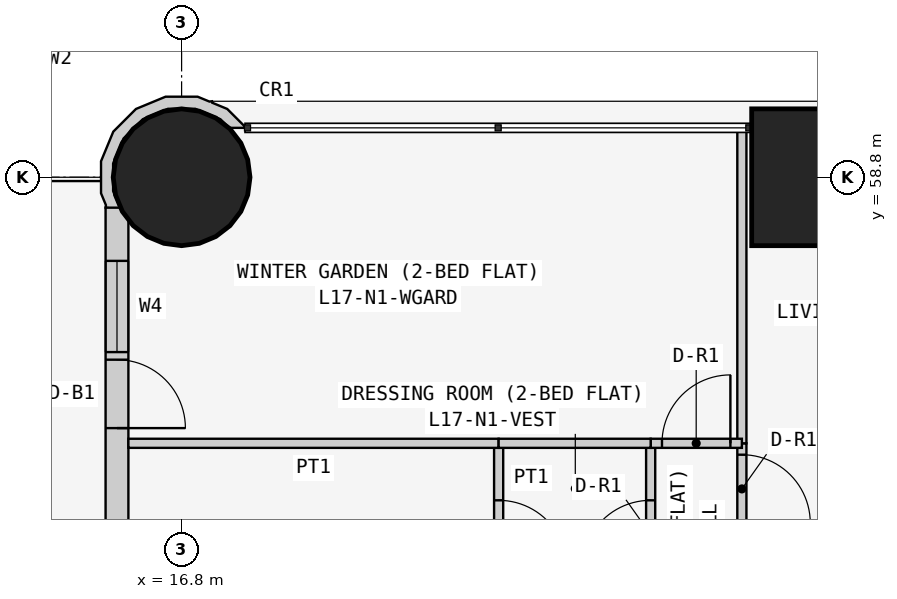
"""IFC4 building model, lengths in metres.
Left out: names, types, materials, properties, quantities, classifications, styles, units other than length and angle.
Written with IfcOpenShell. Run it as: python <this file> out.ifc"""

import sys

from ifc_helpers import new_model, si_unit, direction, frame, frame_2d, origin, origin_2d, place, context, subcontext, project, spatial, polyline, rectangle, circle, outline, extrude, element, fill, save


model = new_model("IFC4")
c1 = context("Model", 3, precision=1e-05, world=origin(), true_north=direction((0.0, 1.0)))
c2 = subcontext(c1, "Body", "Model", "MODEL_VIEW")
j1 = project(units=[si_unit("LENGTHUNIT", "METRE"), si_unit("PLANEANGLEUNIT", "RADIAN")], contexts=[c1])
p1 = place(None, origin())
s1 = spatial("IfcSite", under=j1, at=p1, CompositionType="ELEMENT")
p2 = place(p1, origin())
s2 = spatial("IfcBuilding", under=s1, at=p2, CompositionType="ELEMENT")
p3 = place(p2, frame((0.0, 0.0, 70.5)))
s3 = spatial("IfcBuildingStorey", under=s2, at=p3, CompositionType="ELEMENT", Elevation=70.5)
p4 = place(p3, frame((16.8, 58.8, 0.0), z_axis=(0.0, 0.0, 1.0), x_axis=(1.0, 0.0, 0.0)))
e1 = element("IfcColumn", 1, at=p4, inside=s3, PredefinedType="COLUMN", context=c2, shape_type="SweptSolid", body=[
    extrude(circle(Radius=0.9, at=origin_2d()), origin(), (0.0, 0.0, 1.0), 3.6),
])
p5 = place(p3, frame((25.2, 58.8, 0.0), z_axis=(0.0, 0.0, 1.0), x_axis=(1.0, 0.0, 0.0)))
e2 = element("IfcColumn", 2, at=p5, inside=s3, PredefinedType="COLUMN", context=c2, shape_type="SweptSolid", body=[
    extrude(rectangle(XDim=1.8, YDim=1.8, at=origin_2d()), origin(), (0.0, 0.0, 1.0), 3.6),
])
p6 = place(p3, frame((15.95, 58.4, 0.0), z_axis=(0.0, 0.0, 1.0), x_axis=(0.0, -1.0, 0.0)))
e3 = element("IfcWall", 3, at=p6, inside=s3, PredefinedType="SOLIDWALL", context=c2, shape_type="SweptSolid", body=[
    extrude(rectangle(XDim=15.7, YDim=0.3, at=frame_2d((7.85, 0.0))), origin(), (0.0, 0.0, 1.0), 3.45),
])
p7 = place(p6, frame((12.4, 0.0, 0.9)))
e4 = element("IfcOpeningElement", 4, at=p7, cuts=e3, PredefinedType="OPENING", context=c2, shape_type="SweptSolid", body=[
    extrude(rectangle(XDim=1.8, YDim=1.5, at=frame_2d((0.9, 0.75))), frame((0.0, 0.16, 0.0), z_axis=(0.0, -1.0, 0.0), x_axis=(1.0, 0.0, 0.0)), (0.0, 0.0, 1.0), 0.32),
])
p8 = place(p6, frame((9.55, 0.0, 1.5)))
e5 = element("IfcOpeningElement", 5, at=p8, cuts=e3, PredefinedType="OPENING", context=c2, shape_type="SweptSolid", body=[
    extrude(rectangle(XDim=0.9, YDim=0.7, at=frame_2d((0.45, 0.35))), frame((0.0, 0.16, 0.0), z_axis=(0.0, -1.0, 0.0), x_axis=(1.0, 0.0, 0.0)), (0.0, 0.0, 1.0), 0.32),
])
p9 = place(p6, frame((5.1, 0.0, 0.9)))
e6 = element("IfcOpeningElement", 6, at=p9, cuts=e3, PredefinedType="OPENING", context=c2, shape_type="SweptSolid", body=[
    extrude(rectangle(XDim=1.8, YDim=1.5, at=frame_2d((0.9, 0.75))), frame((0.0, 0.16, 0.0), z_axis=(0.0, -1.0, 0.0), x_axis=(1.0, 0.0, 0.0)), (0.0, 0.0, 1.0), 0.32),
])
p10 = place(p6, frame((2.0, 0.0, 0.0)))
e7 = element("IfcOpeningElement", 7, at=p10, cuts=e3, PredefinedType="OPENING", context=c2, shape_type="SweptSolid", body=[
    extrude(rectangle(XDim=0.9, YDim=2.4, at=frame_2d((0.45, 1.2))), frame((0.0, 0.16, 0.0), z_axis=(0.0, -1.0, 0.0), x_axis=(1.0, 0.0, 0.0)), (0.0, 0.0, 1.0), 0.32),
])
p11 = place(p6, frame((0.7, 0.0, 0.9)))
e8 = element("IfcOpeningElement", 8, at=p11, cuts=e3, PredefinedType="OPENING", context=c2, shape_type="SweptSolid", body=[
    extrude(rectangle(XDim=1.2, YDim=1.5, at=frame_2d((0.6, 0.75))), frame((0.0, 0.16, 0.0), z_axis=(0.0, -1.0, 0.0), x_axis=(1.0, 0.0, 0.0)), (0.0, 0.0, 1.0), 0.32),
])
p12 = place(p3, frame((17.567, 59.411, 0.0), z_axis=(0.0, 0.0, 1.0), x_axis=(-0.377204953059, 0.926129809145, 0.0)))
e9 = element("IfcWall", 9, at=p12, inside=s3, PredefinedType="SOLIDWALL", context=c2, shape_type="SweptSolid", body=[
    extrude(outline(polyline([(-0.27, 2.017), (-0.37, 1.841), (-0.102, 1.842), (0.23, 1.707), (0.484, 1.455), (0.624, 1.125), (0.626, 0.766), (0.491, 0.434), (0.239, 0.18), (0.09, 0.117), (0.011, -0.078), (0.024, -0.083), (0.329, 0.045), (0.48, 0.198), (0.499, 0.193), (0.508, 0.225), (0.626, 0.345), (0.785, 0.736), (0.782, 1.157), (0.619, 1.546), (0.319, 1.842), (-0.072, 2.002), (-0.24, 2.0), (-0.27, 2.017)])), origin(), (0.0, 0.0, 1.0), 3.45),
])
p13 = place(p3, frame((24.171, 55.3, 0.0), z_axis=(0.0, 0.0, 1.0), x_axis=(0.0, -1.0, 0.0)))
e10 = element("IfcWall", 10, at=p13, inside=s3, PredefinedType="PARTITIONING", context=c2, shape_type="SweptSolid", body=[
    extrude(rectangle(XDim=1.2, YDim=0.12, at=frame_2d((0.6, 0.0))), origin(), (0.0, 0.0, 1.0), 3.45),
])
p14 = place(p13, frame((0.15, 0.0, 0.0)))
e11 = element("IfcOpeningElement", 11, at=p14, cuts=e10, PredefinedType="OPENING", context=c2, shape_type="SweptSolid", body=[
    extrude(rectangle(XDim=0.9, YDim=2.1, at=frame_2d((0.45, 1.05))), frame((0.0, 0.07, 0.0), z_axis=(0.0, -1.0, 0.0), x_axis=(1.0, 0.0, 0.0)), (0.0, 0.0, 1.0), 0.14),
])
p15 = place(p3, frame((24.171, 59.45, 0.0), z_axis=(0.0, 0.0, 1.0), x_axis=(0.0, -1.0, 0.0)))
e12 = element("IfcWall", 12, at=p15, inside=s3, PredefinedType="PARTITIONING", context=c2, shape_type="SweptSolid", body=[
    extrude(rectangle(XDim=4.15, YDim=0.12, at=frame_2d((2.075, 0.0))), origin(), (0.0, 0.0, 1.0), 3.45),
])
p16 = place(p3, frame((22.971, 55.3, 0.0), z_axis=(0.0, 0.0, 1.0), x_axis=(0.0, -1.0, 0.0)))
e13 = element("IfcWall", 13, at=p16, inside=s3, PredefinedType="PARTITIONING", context=c2, shape_type="SweptSolid", body=[
    extrude(rectangle(XDim=2.3, YDim=0.12, at=frame_2d((1.15, 0.0))), origin(), (0.0, 0.0, 1.0), 3.45),
])
p17 = place(p16, frame((0.75, 0.0, 0.0)))
e14 = element("IfcOpeningElement", 14, at=p17, cuts=e13, PredefinedType="OPENING", context=c2, shape_type="SweptSolid", body=[
    extrude(rectangle(XDim=0.9, YDim=2.1, at=frame_2d((0.45, 1.05))), frame((0.0, 0.07, 0.0), z_axis=(0.0, -1.0, 0.0), x_axis=(1.0, 0.0, 0.0)), (0.0, 0.0, 1.0), 0.14),
])
p18 = place(p3, frame((24.171, 55.3, 0.0), z_axis=(0.0, 0.0, 1.0), x_axis=(-1.0, 0.0, 0.0)))
e15 = element("IfcWall", 15, at=p18, inside=s3, PredefinedType="PARTITIONING", context=c2, shape_type="SweptSolid", body=[
    extrude(rectangle(XDim=1.2, YDim=0.12, at=frame_2d((0.6, 0.0))), origin(), (0.0, 0.0, 1.0), 3.45),
])
p19 = place(p18, frame((0.151, 0.0, 0.0)))
e16 = element("IfcOpeningElement", 16, at=p19, cuts=e15, PredefinedType="OPENING", context=c2, shape_type="SweptSolid", body=[
    extrude(rectangle(XDim=0.9, YDim=2.1, at=frame_2d((0.45, 1.05))), frame((0.0, 0.07, 0.0), z_axis=(0.0, -1.0, 0.0), x_axis=(1.0, 0.0, 0.0)), (0.0, 0.0, 1.0), 0.14),
])
p20 = place(p3, frame((20.971, 55.3, 0.0), z_axis=(0.0, 0.0, 1.0), x_axis=(0.0, -1.0, 0.0)))
e17 = element("IfcWall", 17, at=p20, inside=s3, PredefinedType="PARTITIONING", context=c2, shape_type="SweptSolid", body=[
    extrude(rectangle(XDim=2.3, YDim=0.12, at=frame_2d((1.15, 0.0))), origin(), (0.0, 0.0, 1.0), 2.848),
])
p21 = place(p20, frame((0.75, 0.0, 0.0)))
e18 = element("IfcOpeningElement", 18, at=p21, cuts=e17, PredefinedType="OPENING", context=c2, shape_type="SweptSolid", body=[
    extrude(rectangle(XDim=0.9, YDim=2.1, at=frame_2d((0.45, 1.05))), frame((0.0, 0.07, 0.0), z_axis=(0.0, -1.0, 0.0), x_axis=(1.0, 0.0, 0.0)), (0.0, 0.0, 1.0), 0.14),
])
p22 = place(p3, frame((16.1, 55.3, 0.0), z_axis=(0.0, 0.0, 1.0), x_axis=(1.0, 0.0, 0.0)))
e19 = element("IfcWall", 19, at=p22, inside=s3, PredefinedType="PARTITIONING", context=c2, shape_type="SweptSolid", body=[
    extrude(rectangle(XDim=4.871, YDim=0.12, at=frame_2d((2.436, 0.0))), origin(), (0.0, 0.0, 1.0), 3.45),
])
p23 = place(p3, frame((22.971, 55.3, 0.0), z_axis=(0.0, 0.0, 1.0), x_axis=(-1.0, 0.0, 0.0)))
e20 = element("IfcWall", 20, at=p23, inside=s3, PredefinedType="PARTITIONING", context=c2, shape_type="SweptSolid", body=[
    extrude(rectangle(XDim=2.0, YDim=0.12, at=frame_2d((1.0, 0.0))), origin(), (0.0, 0.0, 1.0), 3.45),
])
p24 = place(p10, origin())
e21 = element("IfcDoor", 21, at=p24, inside=s3, OperationType="SINGLE_SWING_RIGHT", PredefinedType="DOOR", context=c2, shape_type="SweptSolid", body=[
    extrude(rectangle(XDim=0.9, YDim=2.4, at=frame_2d((0.45, 1.2))), frame((0.0, 0.025, 0.0), z_axis=(0.0, -1.0, 0.0), x_axis=(1.0, 0.0, 0.0)), (0.0, 0.0, 1.0), 0.05),
])
fill(e7, e21)
p25 = place(p11, origin())
e22 = element("IfcWindow", 22, at=p25, inside=s3, PartitioningType="SINGLE_PANEL", PredefinedType="WINDOW", context=c2, shape_type="SweptSolid", body=[
    extrude(rectangle(XDim=1.2, YDim=1.5, at=frame_2d((0.6, 0.75))), frame((0.0, 0.03, 0.0), z_axis=(0.0, -1.0, 0.0), x_axis=(1.0, 0.0, 0.0)), (0.0, 0.0, 1.0), 0.06),
])
fill(e8, e22)
p26 = place(p14, origin())
e23 = element("IfcDoor", 23, at=p26, inside=s3, OperationType="SINGLE_SWING_RIGHT", PredefinedType="DOOR", context=c2, shape_type="SweptSolid", body=[
    extrude(rectangle(XDim=0.9, YDim=2.1, at=frame_2d((0.45, 1.05))), frame((0.0, 0.025, 0.0), z_axis=(0.0, -1.0, 0.0), x_axis=(1.0, 0.0, 0.0)), (0.0, 0.0, 1.0), 0.05),
])
fill(e11, e23)
p27 = place(p17, frame((0.9, 0.0, 0.0), z_axis=(0.0, 0.0, 1.0), x_axis=(-1.0, 0.0, 0.0)))
e24 = element("IfcDoor", 24, at=p27, inside=s3, OperationType="SINGLE_SWING_LEFT", PredefinedType="DOOR", context=c2, shape_type="SweptSolid", body=[
    extrude(rectangle(XDim=0.9, YDim=2.1, at=frame_2d((0.45, 1.05))), frame((0.0, 0.025, 0.0), z_axis=(0.0, -1.0, 0.0), x_axis=(1.0, 0.0, 0.0)), (0.0, 0.0, 1.0), 0.05),
])
fill(e14, e24)
p28 = place(p21, origin())
e25 = element("IfcDoor", 25, at=p28, inside=s3, OperationType="SINGLE_SWING_RIGHT", PredefinedType="DOOR", context=c2, shape_type="SweptSolid", body=[
    extrude(rectangle(XDim=0.9, YDim=2.1, at=frame_2d((0.45, 1.05))), frame((0.0, 0.025, 0.0), z_axis=(0.0, -1.0, 0.0), x_axis=(1.0, 0.0, 0.0)), (0.0, 0.0, 1.0), 0.05),
])
fill(e18, e25)
p29 = place(p19, frame((0.9, 0.0, 0.0), z_axis=(0.0, 0.0, 1.0), x_axis=(-1.0, 0.0, 0.0)))
e26 = element("IfcDoor", 26, at=p29, inside=s3, OperationType="SINGLE_SWING_RIGHT", PredefinedType="DOOR", context=c2, shape_type="SweptSolid", body=[
    extrude(rectangle(XDim=0.9, YDim=2.1, at=frame_2d((0.45, 1.05))), frame((0.0, 0.025, 0.0), z_axis=(0.0, -1.0, 0.0), x_axis=(1.0, 0.0, 0.0)), (0.0, 0.0, 1.0), 0.05),
])
fill(e16, e26)
save(model, sys.argv[1])
